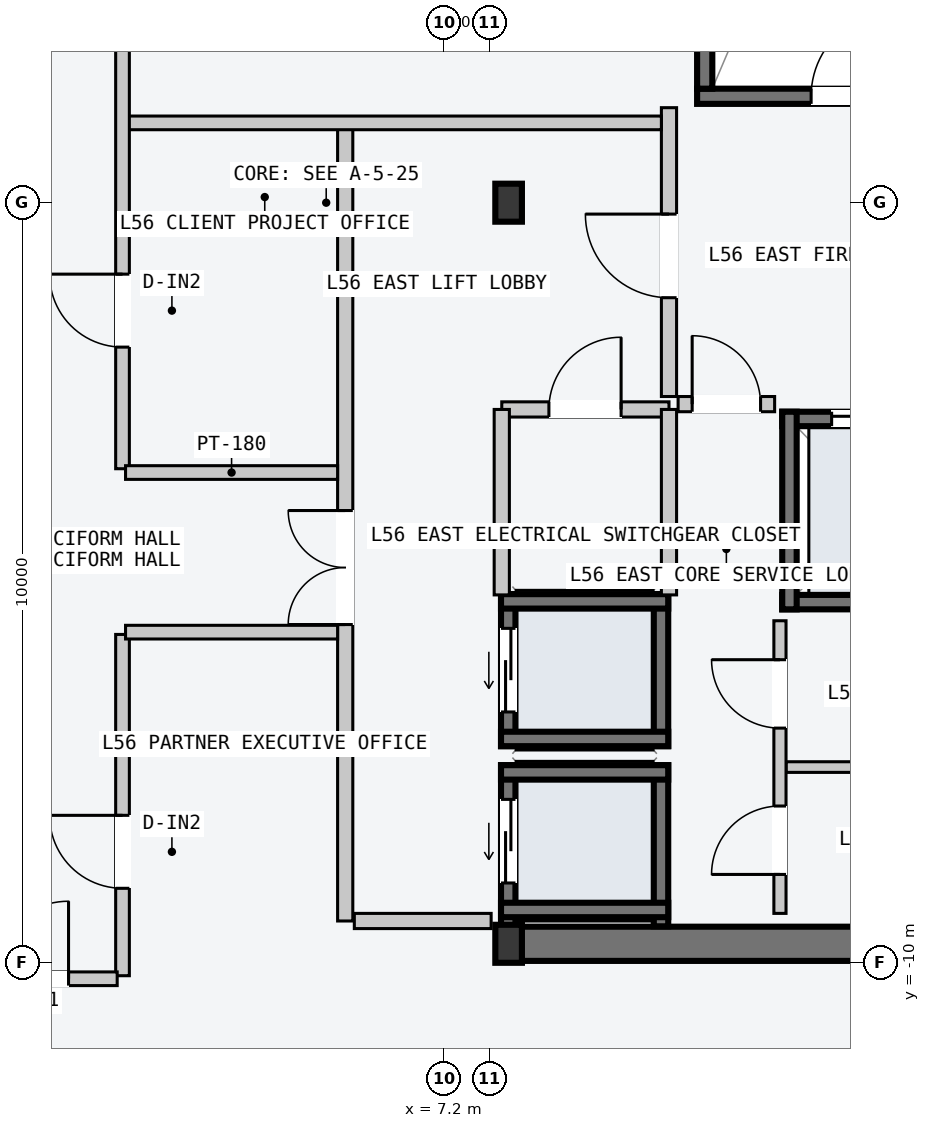
"""IFC4 building model, lengths in metres.
Left out: names, types, materials, properties, quantities, classifications, styles, units other than length and angle.
Written with IfcOpenShell. Run it as: python <this file> out.ifc"""

import sys

from ifc_helpers import new_model, si_unit, direction, frame, frame_2d, origin, origin_2d, place, context, subcontext, project, spatial, rectangle, i_section, extrude, element, fill, save


model = new_model("IFC4")
c1 = context("Model", 3, precision=1e-05, world=origin(), true_north=direction((0.0, 1.0)))
c2 = subcontext(c1, "Body", "Model", "MODEL_VIEW")
j1 = project(units=[si_unit("LENGTHUNIT", "METRE"), si_unit("PLANEANGLEUNIT", "RADIAN")], contexts=[c1])
p1 = place(None, origin())
s1 = spatial("IfcSite", under=j1, at=p1, CompositionType="ELEMENT")
p2 = place(p1, origin())
s2 = spatial("IfcBuilding", under=s1, at=p2, CompositionType="ELEMENT")
p3 = place(p2, frame((0.0, 0.0, 213.9)))
s3 = spatial("IfcBuildingStorey", under=s2, at=p3, CompositionType="ELEMENT", Elevation=213.9)
p4 = place(p3, frame((8.07, -9.75, -0.2), z_axis=(0.0, 0.0, 1.0), x_axis=(1.0, 0.0, 0.0)))
e1 = element("IfcWall", 1, at=p4, inside=s3, PredefinedType="SHEAR", context=c2, shape_type="SweptSolid", body=[
    extrude(rectangle(XDim=6.46, YDim=0.45, at=frame_2d((3.23, 0.0))), origin(), (0.0, 0.0, 1.0), 4.5),
])
p5 = place(p3, frame((10.53, 1.4, -0.2), z_axis=(0.0, 0.0, 1.0), x_axis=(1.0, 0.0, 0.0)))
e2 = element("IfcWall", 2, at=p5, inside=s3, PredefinedType="SOLIDWALL", context=c2, shape_type="SweptSolid", body=[
    extrude(rectangle(XDim=3.72, YDim=0.2, at=frame_2d((1.86, 0.0))), origin(), (0.0, 0.0, 1.0), 4.5),
])
p6 = place(p5, frame((1.5, 0.0, 0.2)))
e3 = element("IfcOpeningElement", 3, at=p6, cuts=e2, PredefinedType="OPENING", context=c2, shape_type="SweptSolid", body=[
    extrude(rectangle(XDim=1.12, YDim=2.18, at=frame_2d((0.56, 1.09))), frame((0.0, 0.11, 0.0), z_axis=(0.0, -1.0, 0.0), x_axis=(1.0, 0.0, 0.0)), (0.0, 0.0, 1.0), 0.22),
])
p7 = place(p3, frame((10.63, 1.5, -0.2), z_axis=(0.0, 0.0, 1.0), x_axis=(0.0, 1.0, 0.0)))
e4 = element("IfcWall", 4, at=p7, inside=s3, PredefinedType="SOLIDWALL", context=c2, shape_type="SweptSolid", body=[
    extrude(rectangle(XDim=7.8, YDim=0.2, at=frame_2d((3.9, 0.0))), origin(), (0.0, 0.0, 1.0), 4.5),
])
for number, where, z_axis, x_axis in (
    (5, (8.05, -9.75, 0.0), (0.0, 0.0, 1.0), (1.0, 0.0, 0.0)),
    (6, (8.05, 0.0, 0.0), (0.0, 0.0, 1.0), (1.0, 0.0, 0.0)),
):
    element("IfcColumn", number, at=place(p3, frame(where, z_axis=z_axis, x_axis=x_axis)), inside=s3, PredefinedType="COLUMN", context=c2, shape_type="SweptSolid", body=[
        extrude(i_section(OverallWidth=0.35, OverallDepth=0.5, WebThickness=0.02, FlangeThickness=0.032, at=origin_2d()), origin(), (0.0, 0.0, 1.0), 4.5),
    ])
p8 = place(p3, frame((8.045, -9.52, -0.2), z_axis=(0.0, 0.0, 1.0), x_axis=(0.0, 1.0, 0.0)))
e7 = element("IfcWall", 7, at=p8, inside=s3, PredefinedType="SOLIDWALL", context=c2, shape_type="SweptSolid", body=[
    extrude(rectangle(XDim=2.12, YDim=0.19, at=frame_2d((1.06, 0.0))), origin(), (0.0, 0.0, 1.0), 4.5),
])
p9 = place(p8, frame((0.57, 0.0, 0.2)))
e8 = element("IfcOpeningElement", 8, at=p9, cuts=e7, PredefinedType="OPENING", context=c2, shape_type="SweptSolid", body=[
    extrude(rectangle(XDim=1.1, YDim=2.2, at=frame_2d((0.55, 1.1))), frame((0.0, 0.105, 0.0), z_axis=(0.0, -1.0, 0.0), x_axis=(1.0, 0.0, 0.0)), (0.0, 0.0, 1.0), 0.21),
])
p10 = place(p3, frame((10.055, -9.52, -0.2), z_axis=(0.0, 0.0, 1.0), x_axis=(0.0, 1.0, 0.0)))
e9 = element("IfcWall", 9, at=p10, inside=s3, PredefinedType="SOLIDWALL", context=c2, shape_type="SweptSolid", body=[
    extrude(rectangle(XDim=2.12, YDim=0.19, at=frame_2d((1.06, 0.0))), origin(), (0.0, 0.0, 1.0), 4.5),
])
for number, where, z_axis, x_axis in (
    (10, (7.95, -7.495, -0.2), (0.0, 0.0, 1.0), (1.0, 0.0, 0.0)),
    (11, (7.95, -9.305, -0.2), (0.0, 0.0, 1.0), (1.0, 0.0, 0.0)),
):
    element("IfcWall", number, at=place(p3, frame(where, z_axis=z_axis, x_axis=x_axis)), inside=s3, PredefinedType="SOLIDWALL", context=c2, shape_type="SweptSolid", body=[
        extrude(rectangle(XDim=2.2, YDim=0.19, at=frame_2d((1.1, 0.0))), origin(), (0.0, 0.0, 1.0), 4.5),
    ])
p11 = place(p3, frame((8.045, -7.15, -0.2), z_axis=(0.0, 0.0, 1.0), x_axis=(0.0, 1.0, 0.0)))
e12 = element("IfcWall", 12, at=p11, inside=s3, PredefinedType="SOLIDWALL", context=c2, shape_type="SweptSolid", body=[
    extrude(rectangle(XDim=2.0, YDim=0.19, at=frame_2d((1.0, 0.0))), origin(), (0.0, 0.0, 1.0), 4.5),
])
p12 = place(p11, frame((0.45, 0.0, 0.2)))
e13 = element("IfcOpeningElement", 13, at=p12, cuts=e12, PredefinedType="OPENING", context=c2, shape_type="SweptSolid", body=[
    extrude(rectangle(XDim=1.1, YDim=2.2, at=frame_2d((0.55, 1.1))), frame((0.0, 0.105, 0.0), z_axis=(0.0, -1.0, 0.0), x_axis=(1.0, 0.0, 0.0)), (0.0, 0.0, 1.0), 0.21),
])
p13 = place(p3, frame((10.055, -7.15, -0.2), z_axis=(0.0, 0.0, 1.0), x_axis=(0.0, 1.0, 0.0)))
e14 = element("IfcWall", 14, at=p13, inside=s3, PredefinedType="SOLIDWALL", context=c2, shape_type="SweptSolid", body=[
    extrude(rectangle(XDim=2.0, YDim=0.19, at=frame_2d((1.0, 0.0))), origin(), (0.0, 0.0, 1.0), 4.5),
])
for number, where, z_axis, x_axis in (
    (15, (7.95, -5.245, -0.2), (0.0, 0.0, 1.0), (1.0, 0.0, 0.0)),
    (16, (7.95, -7.055, -0.2), (0.0, 0.0, 1.0), (1.0, 0.0, 0.0)),
):
    element("IfcWall", number, at=place(p3, frame(where, z_axis=z_axis, x_axis=x_axis)), inside=s3, PredefinedType="SOLIDWALL", context=c2, shape_type="SweptSolid", body=[
        extrude(rectangle(XDim=2.2, YDim=0.19, at=frame_2d((1.1, 0.0))), origin(), (0.0, 0.0, 1.0), 4.5),
    ])
p14 = place(p3, frame((11.65, -2.845, -0.2), z_axis=(0.0, 0.0, 1.0), x_axis=(1.0, 0.0, 0.0)))
e17 = element("IfcWall", 17, at=p14, inside=s3, PredefinedType="SOLIDWALL", context=c2, shape_type="SweptSolid", body=[
    extrude(rectangle(XDim=2.68, YDim=0.19, at=frame_2d((1.34, 0.0))), origin(), (0.0, 0.0, 1.0), 4.5),
])
p15 = place(p14, frame((0.65, 0.0, 0.2)))
e18 = element("IfcOpeningElement", 18, at=p15, cuts=e17, PredefinedType="OPENING", context=c2, shape_type="SweptSolid", body=[
    extrude(rectangle(XDim=1.2, YDim=2.2, at=frame_2d((0.6, 1.1))), frame((0.0, 0.105, 0.0), z_axis=(0.0, -1.0, 0.0), x_axis=(1.0, 0.0, 0.0)), (0.0, 0.0, 1.0), 0.21),
])
p16 = place(p3, frame((11.65, -5.255, -0.2), z_axis=(0.0, 0.0, 1.0), x_axis=(1.0, 0.0, 0.0)))
e19 = element("IfcWall", 19, at=p16, inside=s3, PredefinedType="SOLIDWALL", context=c2, shape_type="SweptSolid", body=[
    extrude(rectangle(XDim=2.68, YDim=0.19, at=frame_2d((1.34, 0.0))), origin(), (0.0, 0.0, 1.0), 4.5),
])
p17 = place(p3, frame((11.745, -5.35, -0.2), z_axis=(0.0, 0.0, 1.0), x_axis=(0.0, 1.0, 0.0)))
e20 = element("IfcWall", 20, at=p17, inside=s3, PredefinedType="SOLIDWALL", context=c2, shape_type="SweptSolid", body=[
    extrude(rectangle(XDim=2.6, YDim=0.19, at=frame_2d((1.3, 0.0))), origin(), (0.0, 0.0, 1.0), 4.5),
])
p18 = place(p3, frame((5.9, -9.45, 0.0), z_axis=(0.0, 0.0, 1.0), x_axis=(0.0, 1.0, 0.0)))
e21 = element("IfcWall", 21, at=p18, inside=s3, PredefinedType="PARTITIONING", context=c2, shape_type="SweptSolid", body=[
    extrude(rectangle(XDim=10.5, YDim=0.2, at=frame_2d((5.25, 0.0))), origin(), (0.0, 0.0, 1.0), 4.3),
])
p19 = place(p18, frame((3.9, 0.0, 0.0)))
e22 = element("IfcOpeningElement", 22, at=p19, cuts=e21, PredefinedType="OPENING", context=c2, shape_type="SweptSolid", body=[
    extrude(rectangle(XDim=1.5, YDim=2.2, at=frame_2d((0.75, 1.1))), frame((0.0, 0.11, 0.0), z_axis=(0.0, -1.0, 0.0), x_axis=(1.0, 0.0, 0.0)), (0.0, 0.0, 1.0), 0.22),
])
p20 = place(p3, frame((6.02, -9.45, 0.0), z_axis=(0.0, 0.0, 1.0), x_axis=(1.0, 0.0, 0.0)))
e23 = element("IfcWall", 23, at=p20, inside=s3, PredefinedType="PARTITIONING", context=c2, shape_type="SweptSolid", body=[
    extrude(rectangle(XDim=1.8, YDim=0.2, at=frame_2d((0.9, 0.0))), origin(), (0.0, 0.0, 1.0), 4.3),
])
p21 = place(p3, frame((10.16, -2.55, 0.0), z_axis=(0.0, 0.0, 1.0), x_axis=(0.0, 1.0, 0.0)))
e24 = element("IfcWall", 24, at=p21, inside=s3, PredefinedType="PARTITIONING", context=c2, shape_type="SweptSolid", body=[
    extrude(rectangle(XDim=3.8, YDim=0.2, at=frame_2d((1.9, 0.0))), origin(), (0.0, 0.0, 1.0), 4.3),
])
p22 = place(p21, frame((1.3, 0.0, 0.0)))
e25 = element("IfcOpeningElement", 25, at=p22, cuts=e24, PredefinedType="OPENING", context=c2, shape_type="SweptSolid", body=[
    extrude(rectangle(XDim=1.1, YDim=2.15, at=frame_2d((0.55, 1.075))), frame((0.0, 0.11, 0.0), z_axis=(0.0, -1.0, 0.0), x_axis=(1.0, 0.0, 0.0)), (0.0, 0.0, 1.0), 0.22),
])
p23 = place(p3, frame((10.28, -2.65, 0.0), z_axis=(0.0, 0.0, 1.0), x_axis=(1.0, 0.0, 0.0)))
e26 = element("IfcWall", 26, at=p23, inside=s3, PredefinedType="PARTITIONING", context=c2, shape_type="SweptSolid", body=[
    extrude(rectangle(XDim=1.27, YDim=0.2, at=frame_2d((0.635, 0.0))), origin(), (0.0, 0.0, 1.0), 4.3),
])
p24 = place(p23, frame((0.185, 0.0, 0.0)))
e27 = element("IfcOpeningElement", 27, at=p24, cuts=e26, PredefinedType="OPENING", context=c2, shape_type="SweptSolid", body=[
    extrude(rectangle(XDim=0.9, YDim=2.15, at=frame_2d((0.45, 1.075))), frame((0.0, 0.11, 0.0), z_axis=(0.0, -1.0, 0.0), x_axis=(1.0, 0.0, 0.0)), (0.0, 0.0, 1.0), 0.22),
])
p25 = place(p3, frame((7.96, -2.72, 0.0), z_axis=(0.0, 0.0, 1.0), x_axis=(1.0, 0.0, 0.0)))
e28 = element("IfcWall", 28, at=p25, inside=s3, PredefinedType="PARTITIONING", context=c2, shape_type="SweptSolid", body=[
    extrude(rectangle(XDim=2.2, YDim=0.2, at=frame_2d((1.1, 0.0))), origin(), (0.0, 0.0, 1.0), 4.3),
])
p26 = place(p25, frame((0.62, 0.0, 0.0)))
e29 = element("IfcOpeningElement", 29, at=p26, cuts=e28, PredefinedType="OPENING", context=c2, shape_type="SweptSolid", body=[
    extrude(rectangle(XDim=0.95, YDim=2.1, at=frame_2d((0.475, 1.05))), frame((0.0, 0.11, 0.0), z_axis=(0.0, -1.0, 0.0), x_axis=(1.0, 0.0, 0.0)), (0.0, 0.0, 1.0), 0.22),
])
for number, where, z_axis, x_axis in (
    (30, (7.96, -5.16, 0.0), (0.0, 0.0, 1.0), (0.0, 1.0, 0.0)),
    (31, (10.16, -5.16, 0.0), (0.0, 0.0, 1.0), (0.0, 1.0, 0.0)),
):
    element("IfcWall", number, at=place(p3, frame(where, z_axis=z_axis, x_axis=x_axis)), inside=s3, PredefinedType="PARTITIONING", context=c2, shape_type="SweptSolid", body=[
        extrude(rectangle(XDim=2.44, YDim=0.2, at=frame_2d((1.22, 0.0))), origin(), (0.0, 0.0, 1.0), 4.3),
    ])
p27 = place(p3, frame((11.7, -7.425, 0.0), z_axis=(0.0, 0.0, 1.0), x_axis=(1.0, 0.0, 0.0)))
e32 = element("IfcWall", 32, at=p27, inside=s3, PredefinedType="PARTITIONING", context=c2, shape_type="SweptSolid", body=[
    extrude(rectangle(XDim=2.5, YDim=0.14, at=frame_2d((1.25, 0.0))), origin(), (0.0, 0.0, 1.0), 4.3),
])
p28 = place(p3, frame((11.62, -9.35, 0.0), z_axis=(0.0, 0.0, 1.0), x_axis=(0.0, 1.0, 0.0)))
e33 = element("IfcWall", 33, at=p28, inside=s3, PredefinedType="PARTITIONING", context=c2, shape_type="SweptSolid", body=[
    extrude(rectangle(XDim=3.85, YDim=0.16, at=frame_2d((1.925, 0.0))), origin(), (0.0, 0.0, 1.0), 4.3),
])
p29 = place(p28, frame((0.512, 0.0, 0.0)))
e34 = element("IfcOpeningElement", 34, at=p29, cuts=e33, PredefinedType="OPENING", context=c2, shape_type="SweptSolid", body=[
    extrude(rectangle(XDim=0.9, YDim=2.15, at=frame_2d((0.45, 1.075))), frame((0.0, 0.09, 0.0), z_axis=(0.0, -1.0, 0.0), x_axis=(1.0, 0.0, 0.0)), (0.0, 0.0, 1.0), 0.18),
])
p30 = place(p28, frame((2.438, 0.0, 0.0)))
e35 = element("IfcOpeningElement", 35, at=p30, cuts=e33, PredefinedType="OPENING", context=c2, shape_type="SweptSolid", body=[
    extrude(rectangle(XDim=0.9, YDim=2.15, at=frame_2d((0.45, 1.075))), frame((0.0, 0.09, 0.0), z_axis=(0.0, -1.0, 0.0), x_axis=(1.0, 0.0, 0.0)), (0.0, 0.0, 1.0), 0.18),
])
p31 = place(p3, frame((3.01, 1.05, 0.0), z_axis=(0.0, 0.0, 1.0), x_axis=(1.0, 0.0, 0.0)))
e36 = element("IfcWall", 36, at=p31, inside=s3, PredefinedType="PARTITIONING", context=c2, shape_type="SweptSolid", body=[
    extrude(rectangle(XDim=7.05, YDim=0.18, at=frame_2d((3.525, 0.0))), origin(), (0.0, 0.0, 1.0), 4.3),
])
p32 = place(p3, frame((2.97, -3.5, 0.0), z_axis=(0.0, 0.0, 1.0), x_axis=(0.0, 1.0, 0.0)))
e37 = element("IfcWall", 37, at=p32, inside=s3, PredefinedType="PARTITIONING", context=c2, shape_type="SweptSolid", body=[
    extrude(rectangle(XDim=13.67, YDim=0.18, at=frame_2d((6.835, 0.0))), origin(), (0.0, 0.0, 1.0), 4.3),
])
p33 = place(p32, frame((6.1, 0.0, 0.0)))
e38 = element("IfcOpeningElement", 38, at=p33, cuts=e37, PredefinedType="OPENING", context=c2, shape_type="SweptSolid", body=[
    extrude(rectangle(XDim=1.24, YDim=2.24, at=frame_2d((0.62, 1.12))), frame((0.0, 0.1, 0.0), z_axis=(0.0, -1.0, 0.0), x_axis=(1.0, 0.0, 0.0)), (0.0, 0.0, 1.0), 0.2),
])
p34 = place(p32, frame((1.6, 0.0, 0.0)))
e39 = element("IfcOpeningElement", 39, at=p34, cuts=e37, PredefinedType="OPENING", context=c2, shape_type="SweptSolid", body=[
    extrude(rectangle(XDim=0.96, YDim=2.18, at=frame_2d((0.48, 1.09))), frame((0.0, 0.1, 0.0), z_axis=(0.0, -1.0, 0.0), x_axis=(1.0, 0.0, 0.0)), (0.0, 0.0, 1.0), 0.2),
])
p35 = place(p3, frame((3.01, -3.55, 0.0), z_axis=(0.0, 0.0, 1.0), x_axis=(1.0, 0.0, 0.0)))
e40 = element("IfcWall", 40, at=p35, inside=s3, PredefinedType="PARTITIONING", context=c2, shape_type="SweptSolid", body=[
    extrude(rectangle(XDim=2.79, YDim=0.18, at=frame_2d((1.395, 0.0))), origin(), (0.0, 0.0, 1.0), 4.3),
])
p36 = place(p3, frame((2.97, -10.17, 0.0), z_axis=(0.0, 0.0, 1.0), x_axis=(0.0, 1.0, 0.0)))
e41 = element("IfcWall", 41, at=p36, inside=s3, PredefinedType="PARTITIONING", context=c2, shape_type="SweptSolid", body=[
    extrude(rectangle(XDim=4.49, YDim=0.18, at=frame_2d((2.245, 0.0))), origin(), (0.0, 0.0, 1.0), 4.3),
])
p37 = place(p36, frame((1.15, 0.0, 0.0)))
e42 = element("IfcOpeningElement", 42, at=p37, cuts=e41, PredefinedType="OPENING", context=c2, shape_type="SweptSolid", body=[
    extrude(rectangle(XDim=0.96, YDim=2.18, at=frame_2d((0.48, 1.09))), frame((0.0, 0.1, 0.0), z_axis=(0.0, -1.0, 0.0), x_axis=(1.0, 0.0, 0.0)), (0.0, 0.0, 1.0), 0.2),
])
p38 = place(p3, frame((3.01, -5.65, 0.0), z_axis=(0.0, 0.0, 1.0), x_axis=(1.0, 0.0, 0.0)))
e43 = element("IfcWall", 43, at=p38, inside=s3, PredefinedType="PARTITIONING", context=c2, shape_type="SweptSolid", body=[
    extrude(rectangle(XDim=2.79, YDim=0.18, at=frame_2d((1.395, 0.0))), origin(), (0.0, 0.0, 1.0), 4.3),
])
p39 = place(p3, frame((0.6, -10.21, 0.0), z_axis=(0.0, 0.0, 1.0), x_axis=(1.0, 0.0, 0.0)))
e44 = element("IfcWall", 44, at=p39, inside=s3, PredefinedType="PARTITIONING", context=c2, shape_type="SweptSolid", body=[
    extrude(rectangle(XDim=2.3, YDim=0.18, at=frame_2d((1.15, 0.0))), origin(), (0.0, 0.0, 1.0), 4.3),
])
p40 = place(p39, frame((0.64, 0.0, 0.0)))
e45 = element("IfcOpeningElement", 45, at=p40, cuts=e44, PredefinedType="OPENING", context=c2, shape_type="SweptSolid", body=[
    extrude(rectangle(XDim=1.02, YDim=2.2, at=frame_2d((0.51, 1.1))), frame((0.0, 0.1, 0.0), z_axis=(0.0, -1.0, 0.0), x_axis=(1.0, 0.0, 0.0)), (0.0, 0.0, 1.0), 0.2),
])
p41 = place(p6, origin())
e46 = element("IfcDoor", 46, at=p41, inside=s3, OperationType="SINGLE_SWING_RIGHT", PredefinedType="DOOR", context=c2, shape_type="SweptSolid", body=[
    extrude(rectangle(XDim=1.12, YDim=2.18, at=frame_2d((0.56, 1.09))), frame((0.0, 0.025, 0.0), z_axis=(0.0, -1.0, 0.0), x_axis=(1.0, 0.0, 0.0)), (0.0, 0.0, 1.0), 0.05),
])
fill(e3, e46)
p42 = place(p9, origin())
e47 = element("IfcDoor", 47, at=p42, inside=s3, OperationType="SLIDING_TO_LEFT", PredefinedType="DOOR", context=c2, shape_type="SweptSolid", body=[
    extrude(rectangle(XDim=1.1, YDim=2.2, at=frame_2d((0.55, 1.1))), frame((0.0, 0.025, 0.0), z_axis=(0.0, -1.0, 0.0), x_axis=(1.0, 0.0, 0.0)), (0.0, 0.0, 1.0), 0.05),
])
fill(e8, e47)
p43 = place(p12, origin())
e48 = element("IfcDoor", 48, at=p43, inside=s3, OperationType="SLIDING_TO_LEFT", PredefinedType="DOOR", context=c2, shape_type="SweptSolid", body=[
    extrude(rectangle(XDim=1.1, YDim=2.2, at=frame_2d((0.55, 1.1))), frame((0.0, 0.025, 0.0), z_axis=(0.0, -1.0, 0.0), x_axis=(1.0, 0.0, 0.0)), (0.0, 0.0, 1.0), 0.05),
])
fill(e13, e48)
p44 = place(p15, origin())
e49 = element("IfcDoor", 49, at=p44, inside=s3, OperationType="SLIDING_TO_LEFT", PredefinedType="DOOR", context=c2, shape_type="SweptSolid", body=[
    extrude(rectangle(XDim=1.2, YDim=2.2, at=frame_2d((0.6, 1.1))), frame((0.0, 0.025, 0.0), z_axis=(0.0, -1.0, 0.0), x_axis=(1.0, 0.0, 0.0)), (0.0, 0.0, 1.0), 0.05),
])
fill(e18, e49)
p45 = place(p19, origin())
e50 = element("IfcDoor", 50, at=p45, inside=s3, OperationType="DOUBLE_DOOR_SINGLE_SWING", PredefinedType="DOOR", context=c2, shape_type="SweptSolid", body=[
    extrude(rectangle(XDim=1.5, YDim=2.2, at=frame_2d((0.75, 1.1))), frame((0.0, 0.025, 0.0), z_axis=(0.0, -1.0, 0.0), x_axis=(1.0, 0.0, 0.0)), (0.0, 0.0, 1.0), 0.05),
])
fill(e22, e50)
p46 = place(p22, origin())
e51 = element("IfcDoor", 51, at=p46, inside=s3, OperationType="SINGLE_SWING_RIGHT", PredefinedType="DOOR", context=c2, shape_type="SweptSolid", body=[
    extrude(rectangle(XDim=1.1, YDim=2.15, at=frame_2d((0.55, 1.075))), frame((0.0, 0.025, 0.0), z_axis=(0.0, -1.0, 0.0), x_axis=(1.0, 0.0, 0.0)), (0.0, 0.0, 1.0), 0.05),
])
fill(e25, e51)
p47 = place(p24, origin())
e52 = element("IfcDoor", 52, at=p47, inside=s3, OperationType="SINGLE_SWING_LEFT", PredefinedType="DOOR", context=c2, shape_type="SweptSolid", body=[
    extrude(rectangle(XDim=0.9, YDim=2.15, at=frame_2d((0.45, 1.075))), frame((0.0, 0.025, 0.0), z_axis=(0.0, -1.0, 0.0), x_axis=(1.0, 0.0, 0.0)), (0.0, 0.0, 1.0), 0.05),
])
fill(e27, e52)
p48 = place(p26, origin())
e53 = element("IfcDoor", 53, at=p48, inside=s3, OperationType="SINGLE_SWING_RIGHT", PredefinedType="DOOR", context=c2, shape_type="SweptSolid", body=[
    extrude(rectangle(XDim=0.95, YDim=2.1, at=frame_2d((0.475, 1.05))), frame((0.0, 0.025, 0.0), z_axis=(0.0, -1.0, 0.0), x_axis=(1.0, 0.0, 0.0)), (0.0, 0.0, 1.0), 0.05),
])
fill(e29, e53)
p49 = place(p29, origin())
e54 = element("IfcDoor", 54, at=p49, inside=s3, OperationType="SINGLE_SWING_LEFT", PredefinedType="DOOR", context=c2, shape_type="SweptSolid", body=[
    extrude(rectangle(XDim=0.9, YDim=2.15, at=frame_2d((0.45, 1.075))), frame((0.0, 0.025, 0.0), z_axis=(0.0, -1.0, 0.0), x_axis=(1.0, 0.0, 0.0)), (0.0, 0.0, 1.0), 0.05),
])
fill(e34, e54)
p50 = place(p30, origin())
e55 = element("IfcDoor", 55, at=p50, inside=s3, OperationType="SINGLE_SWING_RIGHT", PredefinedType="DOOR", context=c2, shape_type="SweptSolid", body=[
    extrude(rectangle(XDim=0.9, YDim=2.15, at=frame_2d((0.45, 1.075))), frame((0.0, 0.025, 0.0), z_axis=(0.0, -1.0, 0.0), x_axis=(1.0, 0.0, 0.0)), (0.0, 0.0, 1.0), 0.05),
])
fill(e35, e55)
p51 = place(p34, origin())
e56 = element("IfcDoor", 56, at=p51, inside=s3, OperationType="SINGLE_SWING_RIGHT", PredefinedType="DOOR", context=c2, shape_type="SweptSolid", body=[
    extrude(rectangle(XDim=0.96, YDim=2.18, at=frame_2d((0.48, 1.09))), frame((0.0, 0.025, 0.0), z_axis=(0.0, -1.0, 0.0), x_axis=(1.0, 0.0, 0.0)), (0.0, 0.0, 1.0), 0.05),
])
fill(e39, e56)
p52 = place(p37, origin())
e57 = element("IfcDoor", 57, at=p52, inside=s3, OperationType="SINGLE_SWING_RIGHT", PredefinedType="DOOR", context=c2, shape_type="SweptSolid", body=[
    extrude(rectangle(XDim=0.96, YDim=2.18, at=frame_2d((0.48, 1.09))), frame((0.0, 0.025, 0.0), z_axis=(0.0, -1.0, 0.0), x_axis=(1.0, 0.0, 0.0)), (0.0, 0.0, 1.0), 0.05),
])
fill(e42, e57)
p53 = place(p40, origin())
e58 = element("IfcDoor", 58, at=p53, inside=s3, OperationType="SINGLE_SWING_RIGHT", PredefinedType="DOOR", context=c2, shape_type="SweptSolid", body=[
    extrude(rectangle(XDim=1.02, YDim=2.2, at=frame_2d((0.51, 1.1))), frame((0.0, 0.025, 0.0), z_axis=(0.0, -1.0, 0.0), x_axis=(1.0, 0.0, 0.0)), (0.0, 0.0, 1.0), 0.05),
])
fill(e45, e58)
save(model, sys.argv[1])
